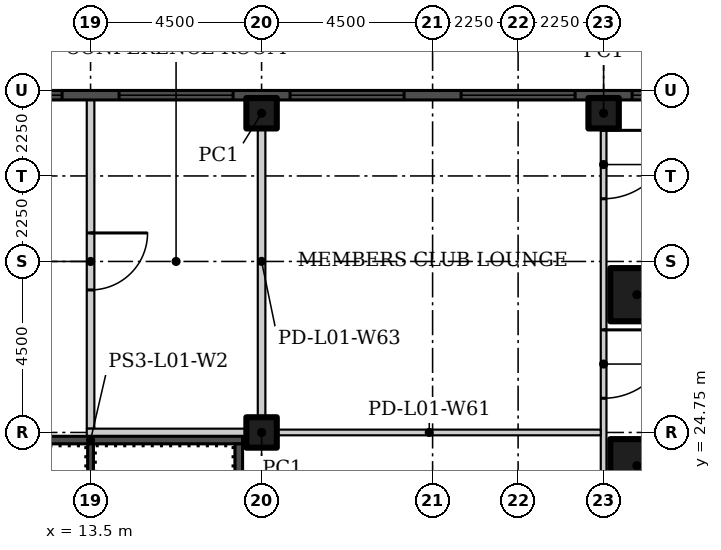
"""IFC4 building model, lengths in metres.
Left out: names, types, materials, properties, quantities, classifications, styles, units other than length and angle.
Written with IfcOpenShell. Run it as: python <this file> out.ifc"""

import sys

from ifc_helpers import new_model, si_unit, direction, frame, frame_2d, origin, origin_2d, place, context, subcontext, project, spatial, rectangle, hollow_rectangle, extrude, element, fill, save


model = new_model("IFC4")
c1 = context("Model", 3, precision=1e-05, world=origin(), true_north=direction((0.0, 1.0)))
c2 = subcontext(c1, "Body", "Model", "MODEL_VIEW")
j1 = project(units=[si_unit("LENGTHUNIT", "METRE"), si_unit("PLANEANGLEUNIT", "RADIAN")], contexts=[c1])
p1 = place(None, origin())
s1 = spatial("IfcSite", under=j1, at=p1, CompositionType="ELEMENT")
p2 = place(p1, origin())
s2 = spatial("IfcBuilding", under=s1, at=p2, CompositionType="ELEMENT")
p3 = place(p2, frame((0.0, 0.0, 6.5)))
s3 = spatial("IfcBuildingStorey", under=s2, at=p3, CompositionType="ELEMENT", Elevation=6.5)
for number, where in (
    (1, (27.875, 23.875, 0.0)),
    (2, (27.875, 28.375, 0.0)),
):
    element("IfcColumn", number, at=place(p3, frame(where)), inside=s3, PredefinedType="COLUMN", context=c2, shape_type="SweptSolid", body=[
        extrude(hollow_rectangle(XDim=1.4, YDim=1.4, WallThickness=0.06, at=origin_2d()), origin(), (0.0, 0.0, 1.0), 5.6),
    ])
for number, where in (
    (3, (18.0, 24.75, 0.0)),
    (4, (18.0, 33.15, 0.0)),
    (5, (27.0, 33.15, 0.0)),
):
    element("IfcColumn", number, at=place(p3, frame(where)), inside=s3, PredefinedType="COLUMN", context=c2, shape_type="SweptSolid", body=[
        extrude(hollow_rectangle(XDim=0.8, YDim=0.8, WallThickness=0.03, at=origin_2d()), origin(), (0.0, 0.0, 1.0), 5.6),
    ])
p4 = place(p3, frame((27.0, 33.655, 0.0), z_axis=(0.0, 0.0, 1.0), x_axis=(0.0, -1.0, 0.0)))
e6 = element("IfcWall", 6, at=p4, inside=s3, PredefinedType="PARTITIONING", context=c2, shape_type="SweptSolid", body=[
    extrude(rectangle(XDim=26.905, YDim=0.15, at=frame_2d((13.453, 0.0))), origin(), (0.0, 0.0, 1.0), 5.6),
])
p5 = place(p4, frame((0.955, 0.0, 0.0)))
e7 = element("IfcOpeningElement", 7, at=p5, cuts=e6, PredefinedType="OPENING", context=c2, shape_type="SweptSolid", body=[
    extrude(rectangle(XDim=1.8, YDim=2.4, at=frame_2d((0.9, 1.2))), frame((0.0, 0.085, 0.0), z_axis=(0.0, -1.0, 0.0), x_axis=(1.0, 0.0, 0.0)), (0.0, 0.0, 1.0), 0.17),
])
p6 = place(p4, frame((6.205, 0.0, 0.0)))
e8 = element("IfcOpeningElement", 8, at=p6, cuts=e6, PredefinedType="OPENING", context=c2, shape_type="SweptSolid", body=[
    extrude(rectangle(XDim=1.8, YDim=2.4, at=frame_2d((0.9, 1.2))), frame((0.0, 0.085, 0.0), z_axis=(0.0, -1.0, 0.0), x_axis=(1.0, 0.0, 0.0)), (0.0, 0.0, 1.0), 0.17),
])
p7 = place(p4, frame((10.555, 0.0, 0.0)))
e9 = element("IfcOpeningElement", 9, at=p7, cuts=e6, PredefinedType="OPENING", context=c2, shape_type="SweptSolid", body=[
    extrude(rectangle(XDim=1.5, YDim=2.1, at=frame_2d((0.75, 1.05))), frame((0.0, 0.085, 0.0), z_axis=(0.0, -1.0, 0.0), x_axis=(1.0, 0.0, 0.0)), (0.0, 0.0, 1.0), 0.17),
])
p8 = place(p4, frame((23.305, 0.0, 0.0)))
e10 = element("IfcOpeningElement", 10, at=p8, cuts=e6, PredefinedType="OPENING", context=c2, shape_type="SweptSolid", body=[
    extrude(rectangle(XDim=1.5, YDim=2.1, at=frame_2d((0.75, 1.05))), frame((0.0, 0.085, 0.0), z_axis=(0.0, -1.0, 0.0), x_axis=(1.0, 0.0, 0.0)), (0.0, 0.0, 1.0), 0.17),
])
p9 = place(p3, frame((13.5, 33.655, 0.0), z_axis=(0.0, 0.0, 1.0), x_axis=(0.0, -1.0, 0.0)))
e11 = element("IfcWall", 11, at=p9, inside=s3, PredefinedType="PARTITIONING", context=c2, shape_type="SweptSolid", body=[
    extrude(rectangle(XDim=8.805, YDim=0.2, at=frame_2d((4.402, 0.0))), origin(), (0.0, 0.0, 1.0), 5.6),
])
p10 = place(p9, frame((3.655, 0.0, 0.0)))
e12 = element("IfcOpeningElement", 12, at=p10, cuts=e11, PredefinedType="OPENING", context=c2, shape_type="SweptSolid", body=[
    extrude(rectangle(XDim=1.5, YDim=2.4, at=frame_2d((0.75, 1.2))), frame((0.0, 0.11, 0.0), z_axis=(0.0, -1.0, 0.0), x_axis=(1.0, 0.0, 0.0)), (0.0, 0.0, 1.0), 0.22),
])
p11 = place(p3, frame((18.1, 24.75, 0.0), z_axis=(0.0, 0.0, 1.0), x_axis=(-1.0, 0.0, 0.0)))
e13 = element("IfcWall", 13, at=p11, inside=s3, PredefinedType="PARTITIONING", context=c2, shape_type="SweptSolid", body=[
    extrude(rectangle(XDim=4.7, YDim=0.2, at=frame_2d((2.35, 0.0))), origin(), (0.0, 0.0, 1.0), 5.6),
])
p12 = place(p3, frame((26.925, 24.75, 0.0), z_axis=(0.0, 0.0, 1.0), x_axis=(-1.0, 0.0, 0.0)))
e14 = element("IfcWall", 14, at=p12, inside=s3, PredefinedType="PARTITIONING", context=c2, shape_type="SweptSolid", body=[
    extrude(rectangle(XDim=9.025, YDim=0.15, at=frame_2d((4.513, 0.0))), origin(), (0.0, 0.0, 1.0), 5.6),
])
p13 = place(p3, frame((18.0, 33.655, 0.0), z_axis=(0.0, 0.0, 1.0), x_axis=(0.0, -1.0, 0.0)))
e15 = element("IfcWall", 15, at=p13, inside=s3, PredefinedType="PARTITIONING", context=c2, shape_type="SweptSolid", body=[
    extrude(rectangle(XDim=8.805, YDim=0.2, at=frame_2d((4.402, 0.0))), origin(), (0.0, 0.0, 1.0), 5.6),
])
p14 = place(p3, frame((-67.5, 33.625, -0.35)))
e16 = element("IfcWall", 16, at=p14, inside=s3, PredefinedType="SOLIDWALL", context=c2, shape_type="SweptSolid", body=[
    extrude(rectangle(XDim=130.5, YDim=0.25, at=frame_2d((65.25, 0.0))), origin(), (0.0, 0.0, 1.0), 6.0),
])
p15 = place(p14, frame((126.75, 0.0, 1.35)))
e17 = element("IfcOpeningElement", 17, at=p15, cuts=e16, PredefinedType="OPENING", context=c2, shape_type="SweptSolid", body=[
    extrude(rectangle(XDim=3.0, YDim=1.8, at=frame_2d((1.5, 0.9))), frame((0.0, 0.135, 0.0), z_axis=(0.0, -1.0, 0.0), x_axis=(1.0, 0.0, 0.0)), (0.0, 0.0, 1.0), 0.27),
])
p16 = place(p14, frame((122.25, 0.0, 1.35)))
e18 = element("IfcOpeningElement", 18, at=p16, cuts=e16, PredefinedType="OPENING", context=c2, shape_type="SweptSolid", body=[
    extrude(rectangle(XDim=3.0, YDim=1.8, at=frame_2d((1.5, 0.9))), frame((0.0, 0.135, 0.0), z_axis=(0.0, -1.0, 0.0), x_axis=(1.0, 0.0, 0.0)), (0.0, 0.0, 1.0), 0.27),
])
p17 = place(p14, frame((117.75, 0.0, 1.35)))
e19 = element("IfcOpeningElement", 19, at=p17, cuts=e16, PredefinedType="OPENING", context=c2, shape_type="SweptSolid", body=[
    extrude(rectangle(XDim=3.0, YDim=1.8, at=frame_2d((1.5, 0.9))), frame((0.0, 0.135, 0.0), z_axis=(0.0, -1.0, 0.0), x_axis=(1.0, 0.0, 0.0)), (0.0, 0.0, 1.0), 0.27),
])
p18 = place(p14, frame((113.25, 0.0, 1.35)))
e20 = element("IfcOpeningElement", 20, at=p18, cuts=e16, PredefinedType="OPENING", context=c2, shape_type="SweptSolid", body=[
    extrude(rectangle(XDim=3.0, YDim=1.8, at=frame_2d((1.5, 0.9))), frame((0.0, 0.135, 0.0), z_axis=(0.0, -1.0, 0.0), x_axis=(1.0, 0.0, 0.0)), (0.0, 0.0, 1.0), 0.27),
])
p19 = place(p14, frame((108.75, 0.0, 1.35)))
e21 = element("IfcOpeningElement", 21, at=p19, cuts=e16, PredefinedType="OPENING", context=c2, shape_type="SweptSolid", body=[
    extrude(rectangle(XDim=3.0, YDim=1.8, at=frame_2d((1.5, 0.9))), frame((0.0, 0.135, 0.0), z_axis=(0.0, -1.0, 0.0), x_axis=(1.0, 0.0, 0.0)), (0.0, 0.0, 1.0), 0.27),
])
p20 = place(p14, frame((104.25, 0.0, 1.35)))
e22 = element("IfcOpeningElement", 22, at=p20, cuts=e16, PredefinedType="OPENING", context=c2, shape_type="SweptSolid", body=[
    extrude(rectangle(XDim=3.0, YDim=1.8, at=frame_2d((1.5, 0.9))), frame((0.0, 0.135, 0.0), z_axis=(0.0, -1.0, 0.0), x_axis=(1.0, 0.0, 0.0)), (0.0, 0.0, 1.0), 0.27),
])
p21 = place(p14, frame((99.75, 0.0, 1.35)))
e23 = element("IfcOpeningElement", 23, at=p21, cuts=e16, PredefinedType="OPENING", context=c2, shape_type="SweptSolid", body=[
    extrude(rectangle(XDim=3.0, YDim=1.8, at=frame_2d((1.5, 0.9))), frame((0.0, 0.135, 0.0), z_axis=(0.0, -1.0, 0.0), x_axis=(1.0, 0.0, 0.0)), (0.0, 0.0, 1.0), 0.27),
])
p22 = place(p14, frame((95.25, 0.0, 1.35)))
e24 = element("IfcOpeningElement", 24, at=p22, cuts=e16, PredefinedType="OPENING", context=c2, shape_type="SweptSolid", body=[
    extrude(rectangle(XDim=3.0, YDim=1.8, at=frame_2d((1.5, 0.9))), frame((0.0, 0.135, 0.0), z_axis=(0.0, -1.0, 0.0), x_axis=(1.0, 0.0, 0.0)), (0.0, 0.0, 1.0), 0.27),
])
p23 = place(p14, frame((90.75, 0.0, 1.35)))
e25 = element("IfcOpeningElement", 25, at=p23, cuts=e16, PredefinedType="OPENING", context=c2, shape_type="SweptSolid", body=[
    extrude(rectangle(XDim=3.0, YDim=1.8, at=frame_2d((1.5, 0.9))), frame((0.0, 0.135, 0.0), z_axis=(0.0, -1.0, 0.0), x_axis=(1.0, 0.0, 0.0)), (0.0, 0.0, 1.0), 0.27),
])
p24 = place(p14, frame((86.25, 0.0, 1.35)))
e26 = element("IfcOpeningElement", 26, at=p24, cuts=e16, PredefinedType="OPENING", context=c2, shape_type="SweptSolid", body=[
    extrude(rectangle(XDim=3.0, YDim=1.8, at=frame_2d((1.5, 0.9))), frame((0.0, 0.135, 0.0), z_axis=(0.0, -1.0, 0.0), x_axis=(1.0, 0.0, 0.0)), (0.0, 0.0, 1.0), 0.27),
])
p25 = place(p14, frame((81.75, 0.0, 1.35)))
e27 = element("IfcOpeningElement", 27, at=p25, cuts=e16, PredefinedType="OPENING", context=c2, shape_type="SweptSolid", body=[
    extrude(rectangle(XDim=3.0, YDim=1.8, at=frame_2d((1.5, 0.9))), frame((0.0, 0.135, 0.0), z_axis=(0.0, -1.0, 0.0), x_axis=(1.0, 0.0, 0.0)), (0.0, 0.0, 1.0), 0.27),
])
p26 = place(p14, frame((77.25, 0.0, 1.35)))
e28 = element("IfcOpeningElement", 28, at=p26, cuts=e16, PredefinedType="OPENING", context=c2, shape_type="SweptSolid", body=[
    extrude(rectangle(XDim=3.0, YDim=1.8, at=frame_2d((1.5, 0.9))), frame((0.0, 0.135, 0.0), z_axis=(0.0, -1.0, 0.0), x_axis=(1.0, 0.0, 0.0)), (0.0, 0.0, 1.0), 0.27),
])
p27 = place(p14, frame((72.75, 0.0, 1.35)))
e29 = element("IfcOpeningElement", 29, at=p27, cuts=e16, PredefinedType="OPENING", context=c2, shape_type="SweptSolid", body=[
    extrude(rectangle(XDim=3.0, YDim=1.8, at=frame_2d((1.5, 0.9))), frame((0.0, 0.135, 0.0), z_axis=(0.0, -1.0, 0.0), x_axis=(1.0, 0.0, 0.0)), (0.0, 0.0, 1.0), 0.27),
])
p28 = place(p14, frame((68.25, 0.0, 1.35)))
e30 = element("IfcOpeningElement", 30, at=p28, cuts=e16, PredefinedType="OPENING", context=c2, shape_type="SweptSolid", body=[
    extrude(rectangle(XDim=3.0, YDim=1.8, at=frame_2d((1.5, 0.9))), frame((0.0, 0.135, 0.0), z_axis=(0.0, -1.0, 0.0), x_axis=(1.0, 0.0, 0.0)), (0.0, 0.0, 1.0), 0.27),
])
p29 = place(p14, frame((63.75, 0.0, 1.35)))
e31 = element("IfcOpeningElement", 31, at=p29, cuts=e16, PredefinedType="OPENING", context=c2, shape_type="SweptSolid", body=[
    extrude(rectangle(XDim=3.0, YDim=1.8, at=frame_2d((1.5, 0.9))), frame((0.0, 0.135, 0.0), z_axis=(0.0, -1.0, 0.0), x_axis=(1.0, 0.0, 0.0)), (0.0, 0.0, 1.0), 0.27),
])
p30 = place(p14, frame((59.25, 0.0, 1.35)))
e32 = element("IfcOpeningElement", 32, at=p30, cuts=e16, PredefinedType="OPENING", context=c2, shape_type="SweptSolid", body=[
    extrude(rectangle(XDim=3.0, YDim=1.8, at=frame_2d((1.5, 0.9))), frame((0.0, 0.135, 0.0), z_axis=(0.0, -1.0, 0.0), x_axis=(1.0, 0.0, 0.0)), (0.0, 0.0, 1.0), 0.27),
])
p31 = place(p14, frame((54.75, 0.0, 1.35)))
e33 = element("IfcOpeningElement", 33, at=p31, cuts=e16, PredefinedType="OPENING", context=c2, shape_type="SweptSolid", body=[
    extrude(rectangle(XDim=3.0, YDim=1.8, at=frame_2d((1.5, 0.9))), frame((0.0, 0.135, 0.0), z_axis=(0.0, -1.0, 0.0), x_axis=(1.0, 0.0, 0.0)), (0.0, 0.0, 1.0), 0.27),
])
p32 = place(p14, frame((50.25, 0.0, 1.35)))
e34 = element("IfcOpeningElement", 34, at=p32, cuts=e16, PredefinedType="OPENING", context=c2, shape_type="SweptSolid", body=[
    extrude(rectangle(XDim=3.0, YDim=1.8, at=frame_2d((1.5, 0.9))), frame((0.0, 0.135, 0.0), z_axis=(0.0, -1.0, 0.0), x_axis=(1.0, 0.0, 0.0)), (0.0, 0.0, 1.0), 0.27),
])
p33 = place(p14, frame((45.75, 0.0, 1.35)))
e35 = element("IfcOpeningElement", 35, at=p33, cuts=e16, PredefinedType="OPENING", context=c2, shape_type="SweptSolid", body=[
    extrude(rectangle(XDim=3.0, YDim=1.8, at=frame_2d((1.5, 0.9))), frame((0.0, 0.135, 0.0), z_axis=(0.0, -1.0, 0.0), x_axis=(1.0, 0.0, 0.0)), (0.0, 0.0, 1.0), 0.27),
])
p34 = place(p14, frame((41.25, 0.0, 1.35)))
e36 = element("IfcOpeningElement", 36, at=p34, cuts=e16, PredefinedType="OPENING", context=c2, shape_type="SweptSolid", body=[
    extrude(rectangle(XDim=3.0, YDim=1.8, at=frame_2d((1.5, 0.9))), frame((0.0, 0.135, 0.0), z_axis=(0.0, -1.0, 0.0), x_axis=(1.0, 0.0, 0.0)), (0.0, 0.0, 1.0), 0.27),
])
p35 = place(p14, frame((36.75, 0.0, 1.35)))
e37 = element("IfcOpeningElement", 37, at=p35, cuts=e16, PredefinedType="OPENING", context=c2, shape_type="SweptSolid", body=[
    extrude(rectangle(XDim=3.0, YDim=1.8, at=frame_2d((1.5, 0.9))), frame((0.0, 0.135, 0.0), z_axis=(0.0, -1.0, 0.0), x_axis=(1.0, 0.0, 0.0)), (0.0, 0.0, 1.0), 0.27),
])
p36 = place(p14, frame((32.25, 0.0, 1.35)))
e38 = element("IfcOpeningElement", 38, at=p36, cuts=e16, PredefinedType="OPENING", context=c2, shape_type="SweptSolid", body=[
    extrude(rectangle(XDim=3.0, YDim=1.8, at=frame_2d((1.5, 0.9))), frame((0.0, 0.135, 0.0), z_axis=(0.0, -1.0, 0.0), x_axis=(1.0, 0.0, 0.0)), (0.0, 0.0, 1.0), 0.27),
])
p37 = place(p14, frame((27.75, 0.0, 1.35)))
e39 = element("IfcOpeningElement", 39, at=p37, cuts=e16, PredefinedType="OPENING", context=c2, shape_type="SweptSolid", body=[
    extrude(rectangle(XDim=3.0, YDim=1.8, at=frame_2d((1.5, 0.9))), frame((0.0, 0.135, 0.0), z_axis=(0.0, -1.0, 0.0), x_axis=(1.0, 0.0, 0.0)), (0.0, 0.0, 1.0), 0.27),
])
p38 = place(p14, frame((23.25, 0.0, 1.35)))
e40 = element("IfcOpeningElement", 40, at=p38, cuts=e16, PredefinedType="OPENING", context=c2, shape_type="SweptSolid", body=[
    extrude(rectangle(XDim=3.0, YDim=1.8, at=frame_2d((1.5, 0.9))), frame((0.0, 0.135, 0.0), z_axis=(0.0, -1.0, 0.0), x_axis=(1.0, 0.0, 0.0)), (0.0, 0.0, 1.0), 0.27),
])
p39 = place(p14, frame((18.75, 0.0, 1.35)))
e41 = element("IfcOpeningElement", 41, at=p39, cuts=e16, PredefinedType="OPENING", context=c2, shape_type="SweptSolid", body=[
    extrude(rectangle(XDim=3.0, YDim=1.8, at=frame_2d((1.5, 0.9))), frame((0.0, 0.135, 0.0), z_axis=(0.0, -1.0, 0.0), x_axis=(1.0, 0.0, 0.0)), (0.0, 0.0, 1.0), 0.27),
])
p40 = place(p14, frame((14.25, 0.0, 1.35)))
e42 = element("IfcOpeningElement", 42, at=p40, cuts=e16, PredefinedType="OPENING", context=c2, shape_type="SweptSolid", body=[
    extrude(rectangle(XDim=3.0, YDim=1.8, at=frame_2d((1.5, 0.9))), frame((0.0, 0.135, 0.0), z_axis=(0.0, -1.0, 0.0), x_axis=(1.0, 0.0, 0.0)), (0.0, 0.0, 1.0), 0.27),
])
p41 = place(p14, frame((9.75, 0.0, 1.35)))
e43 = element("IfcOpeningElement", 43, at=p41, cuts=e16, PredefinedType="OPENING", context=c2, shape_type="SweptSolid", body=[
    extrude(rectangle(XDim=3.0, YDim=1.8, at=frame_2d((1.5, 0.9))), frame((0.0, 0.135, 0.0), z_axis=(0.0, -1.0, 0.0), x_axis=(1.0, 0.0, 0.0)), (0.0, 0.0, 1.0), 0.27),
])
p42 = place(p14, frame((5.25, 0.0, 1.35)))
e44 = element("IfcOpeningElement", 44, at=p42, cuts=e16, PredefinedType="OPENING", context=c2, shape_type="SweptSolid", body=[
    extrude(rectangle(XDim=3.0, YDim=1.8, at=frame_2d((1.5, 0.9))), frame((0.0, 0.135, 0.0), z_axis=(0.0, -1.0, 0.0), x_axis=(1.0, 0.0, 0.0)), (0.0, 0.0, 1.0), 0.27),
])
p43 = place(p14, frame((0.75, 0.0, 1.35)))
e45 = element("IfcOpeningElement", 45, at=p43, cuts=e16, PredefinedType="OPENING", context=c2, shape_type="SweptSolid", body=[
    extrude(rectangle(XDim=3.0, YDim=1.8, at=frame_2d((1.5, 0.9))), frame((0.0, 0.135, 0.0), z_axis=(0.0, -1.0, 0.0), x_axis=(1.0, 0.0, 0.0)), (0.0, 0.0, 1.0), 0.27),
])
p44 = place(p3, frame((9.5, 24.55, 0.0)))
e46 = element("IfcWall", 46, at=p44, inside=s3, PredefinedType="SHEAR", context=c2, shape_type="SweptSolid", body=[
    extrude(rectangle(XDim=8.0, YDim=0.2, at=frame_2d((4.0, 0.0))), origin(), (0.0, 0.0, 1.0), 5.6),
])
p45 = place(p3, frame((17.4, 16.05, 0.0), z_axis=(0.0, 0.0, 1.0), x_axis=(0.0, 1.0, 0.0)))
e47 = element("IfcWall", 47, at=p45, inside=s3, PredefinedType="SHEAR", context=c2, shape_type="SweptSolid", body=[
    extrude(rectangle(XDim=8.4, YDim=0.2, at=frame_2d((4.2, 0.0))), origin(), (0.0, 0.0, 1.0), 5.6),
])
p46 = place(p3, frame((13.5, 16.05, 0.0), z_axis=(0.0, 0.0, 1.0), x_axis=(0.0, 1.0, 0.0)))
e48 = element("IfcWall", 48, at=p46, inside=s3, PredefinedType="SHEAR", context=c2, shape_type="SweptSolid", body=[
    extrude(rectangle(XDim=8.4, YDim=0.15, at=frame_2d((4.2, 0.0))), origin(), (0.0, 0.0, 1.0), 5.6),
])
p47 = place(p10, origin())
e49 = element("IfcDoor", 49, at=p47, inside=s3, OperationType="DOUBLE_DOOR_SINGLE_SWING", PredefinedType="DOOR", context=c2, shape_type="SweptSolid", body=[
    extrude(rectangle(XDim=1.5, YDim=2.4, at=frame_2d((0.75, 1.2))), frame((0.0, 0.025, 0.0), z_axis=(0.0, -1.0, 0.0), x_axis=(1.0, 0.0, 0.0)), (0.0, 0.0, 1.0), 0.05),
])
fill(e12, e49)
p48 = place(p5, origin())
e50 = element("IfcDoor", 50, at=p48, inside=s3, OperationType="DOUBLE_DOOR_SINGLE_SWING", PredefinedType="DOOR", context=c2, shape_type="SweptSolid", body=[
    extrude(rectangle(XDim=1.8, YDim=2.4, at=frame_2d((0.9, 1.2))), frame((0.0, 0.025, 0.0), z_axis=(0.0, -1.0, 0.0), x_axis=(1.0, 0.0, 0.0)), (0.0, 0.0, 1.0), 0.05),
])
fill(e7, e50)
p49 = place(p6, origin())
e51 = element("IfcDoor", 51, at=p49, inside=s3, OperationType="DOUBLE_DOOR_SINGLE_SWING", PredefinedType="DOOR", context=c2, shape_type="SweptSolid", body=[
    extrude(rectangle(XDim=1.8, YDim=2.4, at=frame_2d((0.9, 1.2))), frame((0.0, 0.025, 0.0), z_axis=(0.0, -1.0, 0.0), x_axis=(1.0, 0.0, 0.0)), (0.0, 0.0, 1.0), 0.05),
])
fill(e8, e51)
p50 = place(p22, origin())
e52 = element("IfcWindow", 52, at=p50, inside=s3, PartitioningType="TRIPLE_PANEL_VERTICAL", PredefinedType="WINDOW", context=c2, shape_type="SweptSolid", body=[
    extrude(rectangle(XDim=3.0, YDim=1.8, at=frame_2d((1.5, 0.9))), frame((0.0, 0.03, 0.0), z_axis=(0.0, -1.0, 0.0), x_axis=(1.0, 0.0, 0.0)), (0.0, 0.0, 1.0), 0.06),
])
fill(e24, e52)
p51 = place(p23, origin())
e53 = element("IfcWindow", 53, at=p51, inside=s3, PartitioningType="TRIPLE_PANEL_VERTICAL", PredefinedType="WINDOW", context=c2, shape_type="SweptSolid", body=[
    extrude(rectangle(XDim=3.0, YDim=1.8, at=frame_2d((1.5, 0.9))), frame((0.0, 0.03, 0.0), z_axis=(0.0, -1.0, 0.0), x_axis=(1.0, 0.0, 0.0)), (0.0, 0.0, 1.0), 0.06),
])
fill(e25, e53)
p52 = place(p24, origin())
e54 = element("IfcWindow", 54, at=p52, inside=s3, PartitioningType="TRIPLE_PANEL_VERTICAL", PredefinedType="WINDOW", context=c2, shape_type="SweptSolid", body=[
    extrude(rectangle(XDim=3.0, YDim=1.8, at=frame_2d((1.5, 0.9))), frame((0.0, 0.03, 0.0), z_axis=(0.0, -1.0, 0.0), x_axis=(1.0, 0.0, 0.0)), (0.0, 0.0, 1.0), 0.06),
])
fill(e26, e54)
p53 = place(p25, origin())
e55 = element("IfcWindow", 55, at=p53, inside=s3, PartitioningType="TRIPLE_PANEL_VERTICAL", PredefinedType="WINDOW", context=c2, shape_type="SweptSolid", body=[
    extrude(rectangle(XDim=3.0, YDim=1.8, at=frame_2d((1.5, 0.9))), frame((0.0, 0.03, 0.0), z_axis=(0.0, -1.0, 0.0), x_axis=(1.0, 0.0, 0.0)), (0.0, 0.0, 1.0), 0.06),
])
fill(e27, e55)
p54 = place(p26, origin())
e56 = element("IfcWindow", 56, at=p54, inside=s3, PartitioningType="TRIPLE_PANEL_VERTICAL", PredefinedType="WINDOW", context=c2, shape_type="SweptSolid", body=[
    extrude(rectangle(XDim=3.0, YDim=1.8, at=frame_2d((1.5, 0.9))), frame((0.0, 0.03, 0.0), z_axis=(0.0, -1.0, 0.0), x_axis=(1.0, 0.0, 0.0)), (0.0, 0.0, 1.0), 0.06),
])
fill(e28, e56)
save(model, sys.argv[1])
